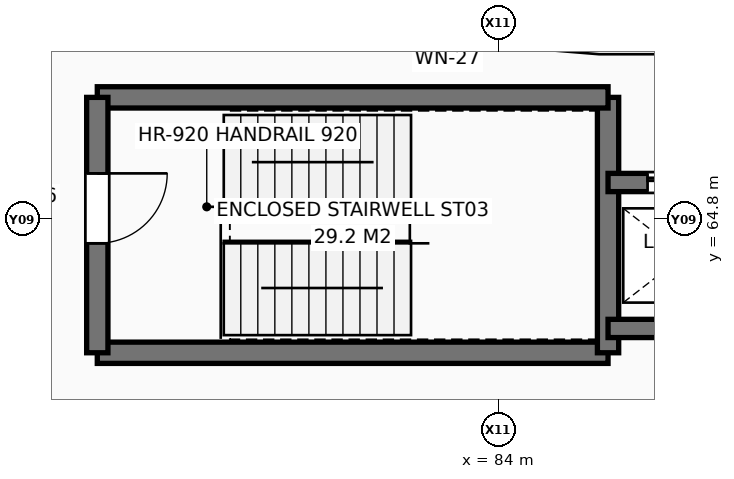
"""IFC4 building model, lengths in metres.
Left out: names, types, materials, properties, quantities, classifications, styles, units other than length and angle.
Written with IfcOpenShell. Run it as: python <this file> out.ifc"""

import sys

from ifc_helpers import new_model, si_unit, direction, frame, frame_2d, origin, place, context, subcontext, project, spatial, rectangle, extrude, element, fill, save


model = new_model("IFC4")
c1 = context("Model", 3, precision=1e-05, world=origin(), true_north=direction((0.0, 1.0)))
c2 = subcontext(c1, "Body", "Model", "MODEL_VIEW")
j1 = project(units=[si_unit("LENGTHUNIT", "METRE"), si_unit("PLANEANGLEUNIT", "RADIAN")], contexts=[c1])
p1 = place(None, origin())
s1 = spatial("IfcSite", under=j1, at=p1, CompositionType="ELEMENT")
p2 = place(p1, origin())
s2 = spatial("IfcBuilding", under=s1, at=p2, CompositionType="ELEMENT")
p3 = place(p2, frame((0.0, 0.0, 13.8)))
s3 = spatial("IfcBuildingStorey", under=s2, at=p3, CompositionType="ELEMENT", Elevation=13.8)
p4 = place(p3, frame((79.229, 68.102, 0.0), z_axis=(0.0, 0.0, 1.0), x_axis=(0.999197440075, -0.040055907767, 0.0)))
e1 = element("IfcWall", 1, at=p4, inside=s3, PredefinedType="SOLIDWALL", context=c2, shape_type="SweptSolid", body=[
    extrude(rectangle(XDim=12.982, YDim=0.34, at=frame_2d((6.491, 0.0))), origin(), (0.0, 0.0, 1.0), 3.387),
])
p5 = place(p4, frame((2.827, 0.0, 0.9)))
e2 = element("IfcOpeningElement", 2, at=p5, cuts=e1, PredefinedType="OPENING", context=c2, shape_type="SweptSolid", body=[
    extrude(rectangle(XDim=2.25, YDim=1.5, at=frame_2d((1.125, 0.75))), frame((0.0, 0.18, 0.0), z_axis=(0.0, -1.0, 0.0), x_axis=(1.0, 0.0, 0.0)), (0.0, 0.0, 1.0), 0.36),
])
p6 = place(p4, frame((7.905, 0.0, 0.9)))
e3 = element("IfcOpeningElement", 3, at=p6, cuts=e1, PredefinedType="OPENING", context=c2, shape_type="SweptSolid", body=[
    extrude(rectangle(XDim=2.25, YDim=1.5, at=frame_2d((1.125, 0.75))), frame((0.0, 0.18, 0.0), z_axis=(0.0, -1.0, 0.0), x_axis=(1.0, 0.0, 0.0)), (0.0, 0.0, 1.0), 0.36),
])
p7 = place(p3, frame((77.4, 62.6, 0.0), z_axis=(0.0, 0.0, 1.0), x_axis=(1.0, 0.0, 0.0)))
e4 = element("IfcWall", 4, at=p7, inside=s3, PredefinedType="SHEAR", context=c2, shape_type="SweptSolid", body=[
    extrude(rectangle(XDim=8.4, YDim=0.35, at=frame_2d((4.2, 0.0))), origin(), (0.0, 0.0, 1.0), 3.92),
])
p8 = place(p3, frame((85.8, 62.6, 0.0), z_axis=(0.0, 0.0, 1.0), x_axis=(0.0, 1.0, 0.0)))
e5 = element("IfcWall", 5, at=p8, inside=s3, PredefinedType="SHEAR", context=c2, shape_type="SweptSolid", body=[
    extrude(rectangle(XDim=4.2, YDim=0.35, at=frame_2d((2.1, 0.0))), origin(), (0.0, 0.0, 1.0), 3.92),
])
p9 = place(p3, frame((85.8, 66.8, 0.0), z_axis=(0.0, 0.0, 1.0), x_axis=(-1.0, 0.0, 0.0)))
e6 = element("IfcWall", 6, at=p9, inside=s3, PredefinedType="SHEAR", context=c2, shape_type="SweptSolid", body=[
    extrude(rectangle(XDim=8.4, YDim=0.35, at=frame_2d((4.2, 0.0))), origin(), (0.0, 0.0, 1.0), 3.92),
])
p10 = place(p3, frame((77.4, 66.8, 0.0), z_axis=(0.0, 0.0, 1.0), x_axis=(0.0, -1.0, 0.0)))
e7 = element("IfcWall", 7, at=p10, inside=s3, PredefinedType="SHEAR", context=c2, shape_type="SweptSolid", body=[
    extrude(rectangle(XDim=4.2, YDim=0.35, at=frame_2d((2.1, 0.0))), origin(), (0.0, 0.0, 1.0), 3.92),
])
p11 = place(p10, frame((1.25, 0.0, 0.0)))
e8 = element("IfcOpeningElement", 8, at=p11, cuts=e7, PredefinedType="OPENING", context=c2, shape_type="SweptSolid", body=[
    extrude(rectangle(XDim=1.15, YDim=2.2, at=frame_2d((0.575, 1.1))), frame((0.0, 0.185, 0.0), z_axis=(0.0, -1.0, 0.0), x_axis=(1.0, 0.0, 0.0)), (0.0, 0.0, 1.0), 0.37),
])
p12 = place(p3, frame((88.3, 65.4, 0.0), z_axis=(0.0, 0.0, 1.0), x_axis=(-1.0, 0.0, 0.0)))
e9 = element("IfcWall", 9, at=p12, inside=s3, PredefinedType="SHEAR", context=c2, shape_type="SweptSolid", body=[
    extrude(rectangle(XDim=2.5, YDim=0.3, at=frame_2d((1.25, 0.0))), origin(), (0.0, 0.0, 1.0), 3.92),
])
p13 = place(p12, frame((0.65, 0.0, 0.0)))
e10 = element("IfcOpeningElement", 10, at=p13, cuts=e9, PredefinedType="OPENING", context=c2, shape_type="SweptSolid", body=[
    extrude(rectangle(XDim=1.2, YDim=2.25, at=frame_2d((0.6, 1.125))), frame((0.0, 0.16, 0.0), z_axis=(0.0, -1.0, 0.0), x_axis=(1.0, 0.0, 0.0)), (0.0, 0.0, 1.0), 0.32),
])
p14 = place(p3, frame((85.8, 63.0, 0.0), z_axis=(0.0, 0.0, 1.0), x_axis=(1.0, 0.0, 0.0)))
e11 = element("IfcWall", 11, at=p14, inside=s3, PredefinedType="SHEAR", context=c2, shape_type="SweptSolid", body=[
    extrude(rectangle(XDim=2.5, YDim=0.3, at=frame_2d((1.25, 0.0))), origin(), (0.0, 0.0, 1.0), 3.92),
])
p15 = place(p11, origin())
e12 = element("IfcDoor", 12, at=p15, inside=s3, OperationType="SINGLE_SWING_LEFT", PredefinedType="DOOR", context=c2, shape_type="SweptSolid", body=[
    extrude(rectangle(XDim=1.15, YDim=2.2, at=frame_2d((0.575, 1.1))), frame((0.0, 0.025, 0.0), z_axis=(0.0, -1.0, 0.0), x_axis=(1.0, 0.0, 0.0)), (0.0, 0.0, 1.0), 0.05),
])
fill(e8, e12)
p16 = place(p13, origin())
e13 = element("IfcDoor", 13, at=p16, inside=s3, OperationType="SLIDING_TO_LEFT", PredefinedType="DOOR", context=c2, shape_type="SweptSolid", body=[
    extrude(rectangle(XDim=1.2, YDim=2.25, at=frame_2d((0.6, 1.125))), frame((0.0, 0.025, 0.0), z_axis=(0.0, -1.0, 0.0), x_axis=(1.0, 0.0, 0.0)), (0.0, 0.0, 1.0), 0.05),
])
fill(e10, e13)
save(model, sys.argv[1])
